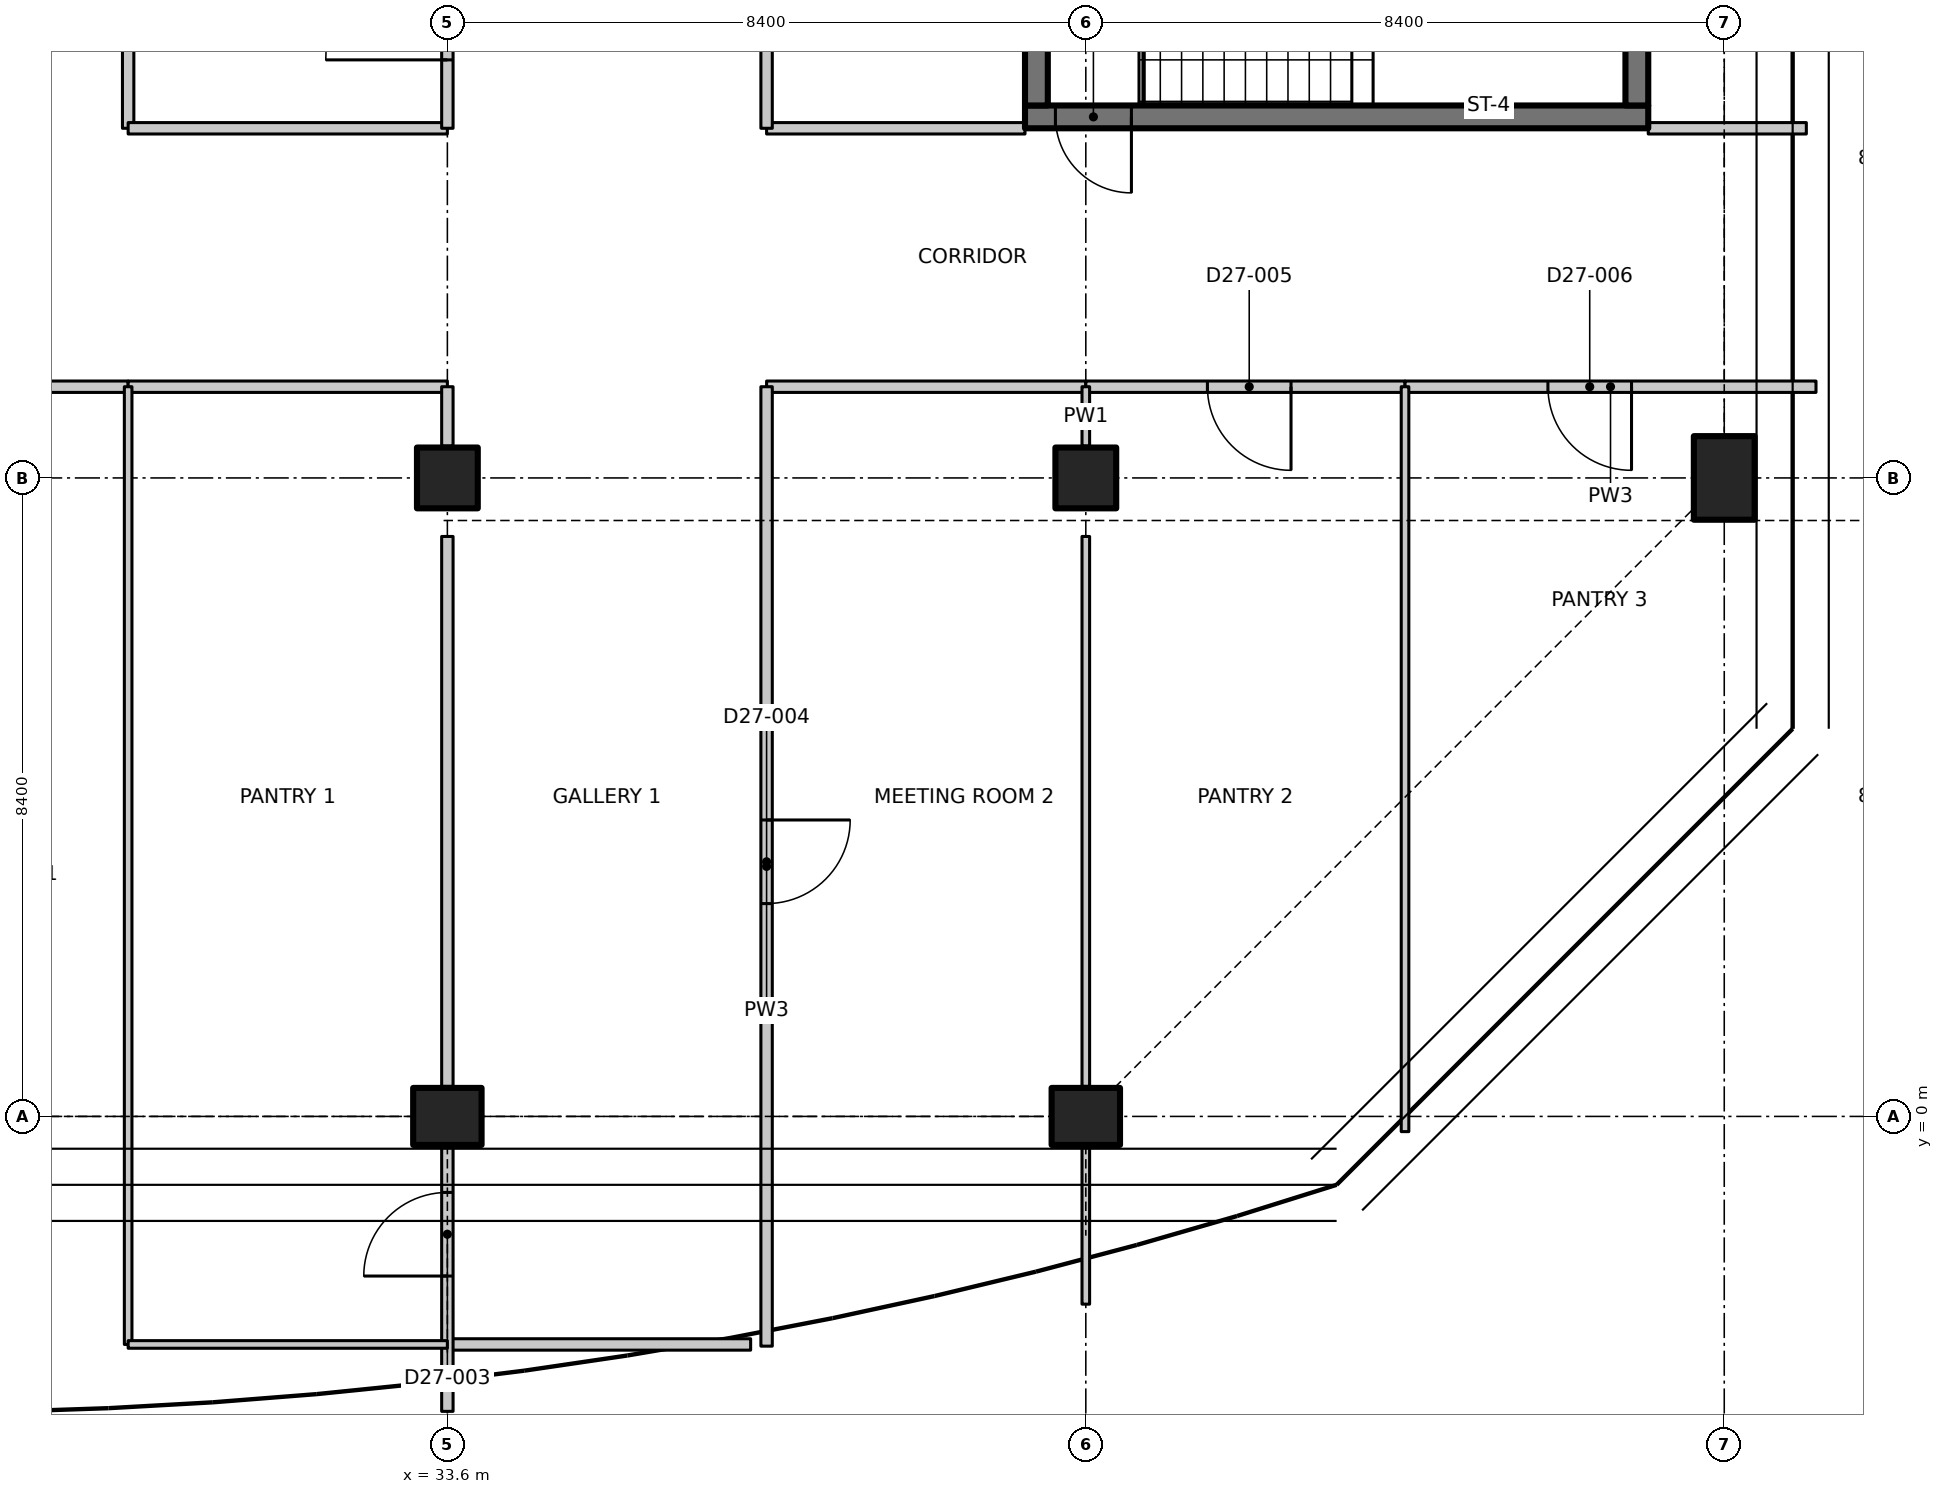
"""IFC4 building model, lengths in metres.
Left out: names, types, materials, properties, quantities, classifications, styles, units other than length and angle.
Written with IfcOpenShell. Run it as: python <this file> out.ifc"""

import sys

from ifc_helpers import new_model, si_unit, direction, frame, frame_2d, origin, origin_2d, place, context, subcontext, project, spatial, polyline, rectangle, outline, extrude, element, fill, save


model = new_model("IFC4")
c1 = context("Model", 3, precision=1e-05, world=origin(), true_north=direction((0.0, 1.0)))
c2 = subcontext(c1, "Body", "Model", "MODEL_VIEW")
j1 = project(units=[si_unit("LENGTHUNIT", "METRE"), si_unit("PLANEANGLEUNIT", "RADIAN")], contexts=[c1])
p1 = place(None, origin())
s1 = spatial("IfcSite", under=j1, at=p1, CompositionType="ELEMENT")
p2 = place(p1, origin())
s2 = spatial("IfcBuilding", under=s1, at=p2, CompositionType="ELEMENT")
p3 = place(p2, frame((0.0, 0.0, 219.3)))
s3 = spatial("IfcBuildingStorey", under=s2, at=p3, CompositionType="ELEMENT", Elevation=219.3)
p4 = place(p3, frame((33.6, 0.0, 0.0), z_axis=(0.0, 0.0, 1.0), x_axis=(0.0, 1.0, 0.0)))
e1 = element("IfcColumn", 1, at=p4, inside=s3, PredefinedType="COLUMN", context=c2, shape_type="SweptSolid", body=[
    extrude(rectangle(XDim=0.75, YDim=0.9, at=origin_2d()), origin(), (0.0, 0.0, 1.0), 3.35),
])
p5 = place(p3, frame((33.6, 8.4, 0.0), z_axis=(0.0, 0.0, 1.0), x_axis=(1.0, 0.0, 0.0)))
e2 = element("IfcColumn", 2, at=p5, inside=s3, PredefinedType="COLUMN", context=c2, shape_type="SweptSolid", body=[
    extrude(rectangle(XDim=0.8, YDim=0.8, at=origin_2d()), origin(), (0.0, 0.0, 1.0), 3.35),
])
p6 = place(p3, frame((42.0, 0.0, 0.0), z_axis=(0.0, 0.0, 1.0), x_axis=(0.0, 1.0, 0.0)))
e3 = element("IfcColumn", 3, at=p6, inside=s3, PredefinedType="COLUMN", context=c2, shape_type="SweptSolid", body=[
    extrude(rectangle(XDim=0.75, YDim=0.9, at=origin_2d()), origin(), (0.0, 0.0, 1.0), 3.35),
])
p7 = place(p3, frame((42.0, 8.4, 0.0), z_axis=(0.0, 0.0, 1.0), x_axis=(1.0, 0.0, 0.0)))
e4 = element("IfcColumn", 4, at=p7, inside=s3, PredefinedType="COLUMN", context=c2, shape_type="SweptSolid", body=[
    extrude(rectangle(XDim=0.8, YDim=0.8, at=origin_2d()), origin(), (0.0, 0.0, 1.0), 3.35),
])
p8 = place(p3, frame((50.4, 8.4, 0.0), z_axis=(0.0, 0.0, 1.0), x_axis=(1.0, 0.0, 0.0)))
e5 = element("IfcColumn", 5, at=p8, inside=s3, PredefinedType="COLUMN", context=c2, shape_type="SweptSolid", body=[
    extrude(rectangle(XDim=0.8, YDim=1.1, at=origin_2d()), origin(), (0.0, 0.0, 1.0), 3.35),
])
p9 = place(p3, frame((49.4, 13.15, 0.0), z_axis=(0.0, 0.0, 1.0), x_axis=(-1.0, 0.0, 0.0)))
e6 = element("IfcWall", 6, at=p9, inside=s3, PredefinedType="SHEAR", context=c2, shape_type="SweptSolid", body=[
    extrude(rectangle(XDim=8.2, YDim=0.3, at=frame_2d((4.1, 0.0))), origin(), (0.0, 0.0, 1.0), 3.35),
])
p10 = place(p9, frame((6.8, 0.0, 0.0)))
e7 = element("IfcOpeningElement", 7, at=p10, cuts=e6, PredefinedType="OPENING", context=c2, shape_type="SweptSolid", body=[
    extrude(rectangle(XDim=1.0, YDim=2.1, at=frame_2d((0.5, 1.05))), frame((0.0, 0.16, 0.0), z_axis=(0.0, -1.0, 0.0), x_axis=(1.0, 0.0, 0.0)), (0.0, 0.0, 1.0), 0.32),
])
for number, where, z_axis, x_axis in (
    (8, (41.35, 13.3, 0.0), (0.0, 0.0, 1.0), (0.0, 1.0, 0.0)),
    (9, (49.25, 13.3, 0.0), (0.0, 0.0, 1.0), (0.0, 1.0, 0.0)),
):
    element("IfcWall", number, at=place(p3, frame(where, z_axis=z_axis, x_axis=x_axis)), inside=s3, PredefinedType="SHEAR", context=c2, shape_type="SweptSolid", body=[
        extrude(rectangle(XDim=2.55, YDim=0.3, at=frame_2d((1.275, 0.0))), origin(), (0.0, 0.0, 1.0), 3.35),
    ])
p11 = place(p3, frame((29.4, 9.6, 0.0), z_axis=(0.0, 0.0, 1.0), x_axis=(-1.0, 0.0, 0.0)))
e10 = element("IfcWall", 10, at=p11, inside=s3, PredefinedType="PARTITIONING", context=c2, shape_type="SweptSolid", body=[
    extrude(rectangle(XDim=4.2, YDim=0.15, at=frame_2d((2.1, 0.0))), origin(), (0.0, 0.0, 1.0), 3.33),
])
p12 = place(p11, frame((1.2, 0.0, 0.0)))
e11 = element("IfcOpeningElement", 11, at=p12, cuts=e10, PredefinedType="OPENING", context=c2, shape_type="SweptSolid", body=[
    extrude(rectangle(XDim=1.6, YDim=2.1, at=frame_2d((0.8, 1.05))), frame((0.0, 0.085, 0.0), z_axis=(0.0, -1.0, 0.0), x_axis=(1.0, 0.0, 0.0)), (0.0, 0.0, 1.0), 0.17),
])
p13 = place(p3, frame((29.4, 21.2, 0.0), z_axis=(0.0, 0.0, 1.0), x_axis=(0.0, -1.0, 0.0)))
e12 = element("IfcWall", 12, at=p13, inside=s3, PredefinedType="PARTITIONING", context=c2, shape_type="SweptSolid", body=[
    extrude(rectangle(XDim=8.2, YDim=0.15, at=frame_2d((4.1, 0.0))), origin(), (0.0, 0.0, 1.0), 3.33),
])
p14 = place(p3, frame((33.6, 9.6, 0.0), z_axis=(0.0, 0.0, 1.0), x_axis=(-1.0, 0.0, 0.0)))
e13 = element("IfcWall", 13, at=p14, inside=s3, PredefinedType="PARTITIONING", context=c2, shape_type="SweptSolid", body=[
    extrude(rectangle(XDim=4.2, YDim=0.15, at=frame_2d((2.1, 0.0))), origin(), (0.0, 0.0, 1.0), 3.33),
])
p15 = place(p3, frame((42.0, 9.6, 0.0), z_axis=(0.0, 0.0, 1.0), x_axis=(-1.0, 0.0, 0.0)))
e14 = element("IfcWall", 14, at=p15, inside=s3, PredefinedType="PARTITIONING", context=c2, shape_type="SweptSolid", body=[
    extrude(rectangle(XDim=4.2, YDim=0.15, at=frame_2d((2.1, 0.0))), origin(), (0.0, 0.0, 1.0), 3.33),
])
p16 = place(p3, frame((46.2, 9.6, 0.0), z_axis=(0.0, 0.0, 1.0), x_axis=(-1.0, 0.0, 0.0)))
e15 = element("IfcWall", 15, at=p16, inside=s3, PredefinedType="PARTITIONING", context=c2, shape_type="SweptSolid", body=[
    extrude(rectangle(XDim=4.2, YDim=0.15, at=frame_2d((2.1, 0.0))), origin(), (0.0, 0.0, 1.0), 3.33),
])
p17 = place(p16, frame((1.5, 0.0, 0.0)))
e16 = element("IfcOpeningElement", 16, at=p17, cuts=e15, PredefinedType="OPENING", context=c2, shape_type="SweptSolid", body=[
    extrude(rectangle(XDim=1.1, YDim=2.1, at=frame_2d((0.55, 1.05))), frame((0.0, 0.085, 0.0), z_axis=(0.0, -1.0, 0.0), x_axis=(1.0, 0.0, 0.0)), (0.0, 0.0, 1.0), 0.17),
])
p18 = place(p3, frame((51.607, 9.6, 0.0), z_axis=(0.0, 0.0, 1.0), x_axis=(-1.0, 0.0, 0.0)))
e17 = element("IfcWall", 17, at=p18, inside=s3, PredefinedType="PARTITIONING", context=c2, shape_type="SweptSolid", body=[
    extrude(outline(polyline([(0.0, 0.0), (5.407, 0.0), (5.407, 3.33), (1.657, 3.33), (1.655, 2.98), (0.759, 2.98), (0.757, 3.33), (0.127, 3.33), (0.0, 3.33), (0.0, 0.0)])), frame((0.0, 0.075, 0.0), z_axis=(0.0, -1.0, 0.0), x_axis=(1.0, 0.0, 0.0)), (0.0, 0.0, 1.0), 0.15),
])
p19 = place(p18, frame((2.427, 0.0, 0.0)))
e18 = element("IfcOpeningElement", 18, at=p19, cuts=e17, PredefinedType="OPENING", context=c2, shape_type="SweptSolid", body=[
    extrude(rectangle(XDim=1.1, YDim=2.1, at=frame_2d((0.55, 1.05))), frame((0.0, 0.085, 0.0), z_axis=(0.0, -1.0, 0.0), x_axis=(1.0, 0.0, 0.0)), (0.0, 0.0, 1.0), 0.17),
])
p20 = place(p3, frame((29.4, 13.0, 0.0), z_axis=(0.0, 0.0, 1.0), x_axis=(1.0, 0.0, 0.0)))
e19 = element("IfcWall", 19, at=p20, inside=s3, PredefinedType="PARTITIONING", context=c2, shape_type="SweptSolid", body=[
    extrude(rectangle(XDim=4.2, YDim=0.15, at=frame_2d((2.1, 0.0))), origin(), (0.0, 0.0, 1.0), 3.33),
])
p21 = place(p3, frame((37.8, 13.0, 0.0), z_axis=(0.0, 0.0, 1.0), x_axis=(1.0, 0.0, 0.0)))
e20 = element("IfcWall", 20, at=p21, inside=s3, PredefinedType="PARTITIONING", context=c2, shape_type="SweptSolid", body=[
    extrude(rectangle(XDim=3.4, YDim=0.15, at=frame_2d((1.7, 0.0))), origin(), (0.0, 0.0, 1.0), 3.33),
])
p22 = place(p3, frame((49.4, 13.0, 0.0), z_axis=(0.0, 0.0, 1.0), x_axis=(1.0, 0.0, 0.0)))
e21 = element("IfcWall", 21, at=p22, inside=s3, PredefinedType="PARTITIONING", context=c2, shape_type="SweptSolid", body=[
    extrude(rectangle(XDim=2.08, YDim=0.15, at=frame_2d((1.04, 0.0))), origin(), (0.0, 0.0, 1.0), 2.98),
])
p23 = place(p3, frame((37.59, -3.0, 0.0), z_axis=(0.0, 0.0, 1.0), x_axis=(-1.0, 0.0, 0.0)))
e22 = element("IfcWall", 22, at=p23, inside=s3, PredefinedType="PARTITIONING", context=c2, shape_type="SweptSolid", body=[
    extrude(rectangle(XDim=3.99, YDim=0.15, at=frame_2d((1.995, 0.0))), origin(), (0.0, 0.0, 1.0), 2.98),
])
p24 = place(p3, frame((33.6, -3.88, 0.0), z_axis=(0.0, 0.0, 1.0), x_axis=(0.0, 1.0, 0.0)))
e23 = element("IfcWall", 23, at=p24, inside=s3, PredefinedType="PARTITIONING", context=c2, shape_type="SweptSolid", body=[
    extrude(rectangle(XDim=3.485, YDim=0.15, at=frame_2d((1.743, 0.0))), origin(), (0.0, 0.0, 1.0), 2.98),
])
p25 = place(p24, frame((1.78, 0.0, 0.0)))
e24 = element("IfcOpeningElement", 24, at=p25, cuts=e23, PredefinedType="OPENING", context=c2, shape_type="SweptSolid", body=[
    extrude(rectangle(XDim=1.1, YDim=2.1, at=frame_2d((0.55, 1.05))), frame((0.0, 0.085, 0.0), z_axis=(0.0, -1.0, 0.0), x_axis=(1.0, 0.0, 0.0)), (0.0, 0.0, 1.0), 0.17),
])
p26 = place(p3, frame((33.6, 0.395, 0.0), z_axis=(0.0, 0.0, 1.0), x_axis=(0.0, 1.0, 0.0)))
e25 = element("IfcWall", 25, at=p26, inside=s3, PredefinedType="PARTITIONING", context=c2, shape_type="SweptSolid", body=[
    extrude(outline(polyline([(0.0, 0.0), (7.235, 0.0), (7.235, 3.33), (0.055, 3.33), (0.053, 2.98), (0.0, 2.98), (0.0, 0.0)])), frame((0.0, 0.075, 0.0), z_axis=(0.0, -1.0, 0.0), x_axis=(1.0, 0.0, 0.0)), (0.0, 0.0, 1.0), 0.15),
])
p27 = place(p3, frame((33.6, 8.82, 0.0), z_axis=(0.0, 0.0, 1.0), x_axis=(0.0, 1.0, 0.0)))
e26 = element("IfcWall", 26, at=p27, inside=s3, PredefinedType="PARTITIONING", context=c2, shape_type="SweptSolid", body=[
    extrude(rectangle(XDim=0.78, YDim=0.15, at=frame_2d((0.39, 0.0))), origin(), (0.0, 0.0, 1.0), 3.33),
])
p28 = place(p3, frame((37.8, 9.6, 0.0), z_axis=(0.0, 0.0, 1.0), x_axis=(0.0, -1.0, 0.0)))
e27 = element("IfcWall", 27, at=p28, inside=s3, PredefinedType="PARTITIONING", context=c2, shape_type="SweptSolid", body=[
    extrude(outline(polyline([(0.0, 0.0), (12.622, 0.0), (12.622, 3.33), (10.05, 3.33), (10.048, 2.98), (9.152, 2.98), (9.15, 3.33), (0.0, 3.33), (0.0, 0.0)])), frame((0.0, 0.075, 0.0), z_axis=(0.0, -1.0, 0.0), x_axis=(1.0, 0.0, 0.0)), (0.0, 0.0, 1.0), 0.15),
])
p29 = place(p28, frame((5.7, 0.0, 0.0)))
e28 = element("IfcOpeningElement", 28, at=p29, cuts=e27, PredefinedType="OPENING", context=c2, shape_type="SweptSolid", body=[
    extrude(rectangle(XDim=1.1, YDim=2.1, at=frame_2d((0.55, 1.05))), frame((0.0, 0.085, 0.0), z_axis=(0.0, -1.0, 0.0), x_axis=(1.0, 0.0, 0.0)), (0.0, 0.0, 1.0), 0.17),
])
p30 = place(p3, frame((29.4, 9.6, 0.0), z_axis=(0.0, 0.0, 1.0), x_axis=(0.0, -1.0, 0.0)))
e29 = element("IfcWall", 29, at=p30, inside=s3, PredefinedType="PARTITIONING", context=c2, shape_type="SweptSolid", body=[
    extrude(outline(polyline([(0.0, 0.0), (12.6, 0.0), (12.6, 3.33), (10.05, 3.33), (10.048, 2.98), (9.152, 2.98), (9.15, 3.33), (0.0, 3.33), (0.0, 0.0)])), frame((0.0, 0.05, 0.0), z_axis=(0.0, -1.0, 0.0), x_axis=(1.0, 0.0, 0.0)), (0.0, 0.0, 1.0), 0.1),
])
p31 = place(p3, frame((29.4, -3.0, 0.0), z_axis=(0.0, 0.0, 1.0), x_axis=(1.0, 0.0, 0.0)))
e30 = element("IfcWall", 30, at=p31, inside=s3, PredefinedType="PARTITIONING", context=c2, shape_type="SweptSolid", body=[
    extrude(rectangle(XDim=4.2, YDim=0.1, at=frame_2d((2.1, 0.0))), origin(), (0.0, 0.0, 1.0), 2.98),
])
p32 = place(p3, frame((42.0, 9.6, 0.0), z_axis=(0.0, 0.0, 1.0), x_axis=(0.0, -1.0, 0.0)))
e31 = element("IfcWall", 31, at=p32, inside=s3, PredefinedType="PARTITIONING", context=c2, shape_type="SweptSolid", body=[
    extrude(rectangle(XDim=0.78, YDim=0.1, at=frame_2d((0.39, 0.0))), origin(), (0.0, 0.0, 1.0), 3.33),
])
p33 = place(p3, frame((42.0, 7.63, 0.0), z_axis=(0.0, 0.0, 1.0), x_axis=(0.0, -1.0, 0.0)))
e32 = element("IfcWall", 32, at=p33, inside=s3, PredefinedType="PARTITIONING", context=c2, shape_type="SweptSolid", body=[
    extrude(outline(polyline([(0.0, 0.0), (7.235, 0.0), (7.235, 2.98), (6.966, 2.98), (6.964, 3.33), (0.0, 3.33), (0.0, 0.0)])), frame((0.0, 0.05, 0.0), z_axis=(0.0, -1.0, 0.0), x_axis=(1.0, 0.0, 0.0)), (0.0, 0.0, 1.0), 0.1),
])
p34 = place(p3, frame((42.0, -0.395, 0.0), z_axis=(0.0, 0.0, 1.0), x_axis=(0.0, -1.0, 0.0)))
e33 = element("IfcWall", 33, at=p34, inside=s3, PredefinedType="PARTITIONING", context=c2, shape_type="SweptSolid", body=[
    extrude(rectangle(XDim=2.075, YDim=0.1, at=frame_2d((1.038, 0.0))), origin(), (0.0, 0.0, 1.0), 2.98),
])
p35 = place(p3, frame((46.2, 9.6, 0.0), z_axis=(0.0, 0.0, 1.0), x_axis=(0.0, -1.0, 0.0)))
e34 = element("IfcWall", 34, at=p35, inside=s3, PredefinedType="PARTITIONING", context=c2, shape_type="SweptSolid", body=[
    extrude(outline(polyline([(0.0, 0.0), (9.8, 0.0), (9.8, 3.33), (6.066, 3.33), (6.064, 2.98), (4.736, 2.98), (4.734, 3.33), (0.0, 3.33), (0.0, 0.0)])), frame((0.0, 0.05, 0.0), z_axis=(0.0, -1.0, 0.0), x_axis=(1.0, 0.0, 0.0)), (0.0, 0.0, 1.0), 0.1),
])
p36 = place(p3, frame((33.6, 13.0, 0.0), z_axis=(0.0, 0.0, 1.0), x_axis=(0.0, 1.0, 0.0)))
e35 = element("IfcWall", 35, at=p36, inside=s3, PredefinedType="PARTITIONING", context=c2, shape_type="SweptSolid", body=[
    extrude(rectangle(XDim=3.38, YDim=0.15, at=frame_2d((1.69, 0.0))), origin(), (0.0, 0.0, 1.0), 3.33),
])
p37 = place(p36, frame((0.9, 0.0, 0.0)))
e36 = element("IfcOpeningElement", 36, at=p37, cuts=e35, PredefinedType="OPENING", context=c2, shape_type="SweptSolid", body=[
    extrude(rectangle(XDim=1.6, YDim=2.1, at=frame_2d((0.8, 1.05))), frame((0.0, 0.085, 0.0), z_axis=(0.0, -1.0, 0.0), x_axis=(1.0, 0.0, 0.0)), (0.0, 0.0, 1.0), 0.17),
])
p38 = place(p3, frame((37.8, 30.526, 0.0), z_axis=(0.0, 0.0, 1.0), x_axis=(0.0, -1.0, 0.0)))
e37 = element("IfcWall", 37, at=p38, inside=s3, PredefinedType="PARTITIONING", context=c2, shape_type="SweptSolid", body=[
    extrude(outline(polyline([(0.0, 0.0), (17.526, 0.0), (17.526, 3.33), (5.776, 3.33), (5.774, 2.98), (4.878, 2.98), (4.876, 3.33), (0.283, 3.33), (0.0, 3.33), (0.0, 0.0)])), frame((0.0, 0.075, 0.0), z_axis=(0.0, -1.0, 0.0), x_axis=(1.0, 0.0, 0.0)), (0.0, 0.0, 1.0), 0.15),
])
p39 = place(p38, frame((8.283, 0.0, 0.0)))
e38 = element("IfcOpeningElement", 38, at=p39, cuts=e37, PredefinedType="OPENING", context=c2, shape_type="SweptSolid", body=[
    extrude(rectangle(XDim=1.6, YDim=2.1, at=frame_2d((0.8, 1.05))), frame((0.0, 0.085, 0.0), z_axis=(0.0, -1.0, 0.0), x_axis=(1.0, 0.0, 0.0)), (0.0, 0.0, 1.0), 0.17),
])
p40 = place(p10, origin())
e39 = element("IfcDoor", 39, at=p40, inside=s3, OperationType="SINGLE_SWING_LEFT", PredefinedType="DOOR", context=c2, shape_type="SweptSolid", body=[
    extrude(rectangle(XDim=1.0, YDim=2.1, at=frame_2d((0.5, 1.05))), frame((0.0, 0.025, 0.0), z_axis=(0.0, -1.0, 0.0), x_axis=(1.0, 0.0, 0.0)), (0.0, 0.0, 1.0), 0.05),
])
fill(e7, e39)
p41 = place(p25, origin())
e40 = element("IfcDoor", 40, at=p41, inside=s3, OperationType="SINGLE_SWING_LEFT", PredefinedType="DOOR", context=c2, shape_type="SweptSolid", body=[
    extrude(rectangle(XDim=1.1, YDim=2.1, at=frame_2d((0.55, 1.05))), frame((0.0, 0.025, 0.0), z_axis=(0.0, -1.0, 0.0), x_axis=(1.0, 0.0, 0.0)), (0.0, 0.0, 1.0), 0.05),
])
fill(e24, e40)
p42 = place(p29, origin())
e41 = element("IfcDoor", 41, at=p42, inside=s3, OperationType="SINGLE_SWING_LEFT", PredefinedType="DOOR", context=c2, shape_type="SweptSolid", body=[
    extrude(rectangle(XDim=1.1, YDim=2.1, at=frame_2d((0.55, 1.05))), frame((0.0, 0.025, 0.0), z_axis=(0.0, -1.0, 0.0), x_axis=(1.0, 0.0, 0.0)), (0.0, 0.0, 1.0), 0.05),
])
fill(e28, e41)
p43 = place(p17, origin())
e42 = element("IfcDoor", 42, at=p43, inside=s3, OperationType="SINGLE_SWING_LEFT", PredefinedType="DOOR", context=c2, shape_type="SweptSolid", body=[
    extrude(rectangle(XDim=1.1, YDim=2.1, at=frame_2d((0.55, 1.05))), frame((0.0, 0.025, 0.0), z_axis=(0.0, -1.0, 0.0), x_axis=(1.0, 0.0, 0.0)), (0.0, 0.0, 1.0), 0.05),
])
fill(e16, e42)
p44 = place(p19, origin())
e43 = element("IfcDoor", 43, at=p44, inside=s3, OperationType="SINGLE_SWING_LEFT", PredefinedType="DOOR", context=c2, shape_type="SweptSolid", body=[
    extrude(rectangle(XDim=1.1, YDim=2.1, at=frame_2d((0.55, 1.05))), frame((0.0, 0.025, 0.0), z_axis=(0.0, -1.0, 0.0), x_axis=(1.0, 0.0, 0.0)), (0.0, 0.0, 1.0), 0.05),
])
fill(e18, e43)
p45 = place(p37, origin())
e44 = element("IfcDoor", 44, at=p45, inside=s3, OperationType="DOUBLE_DOOR_SINGLE_SWING", PredefinedType="DOOR", context=c2, shape_type="SweptSolid", body=[
    extrude(rectangle(XDim=1.6, YDim=2.1, at=frame_2d((0.8, 1.05))), frame((0.0, 0.025, 0.0), z_axis=(0.0, -1.0, 0.0), x_axis=(1.0, 0.0, 0.0)), (0.0, 0.0, 1.0), 0.05),
])
fill(e36, e44)
save(model, sys.argv[1])
